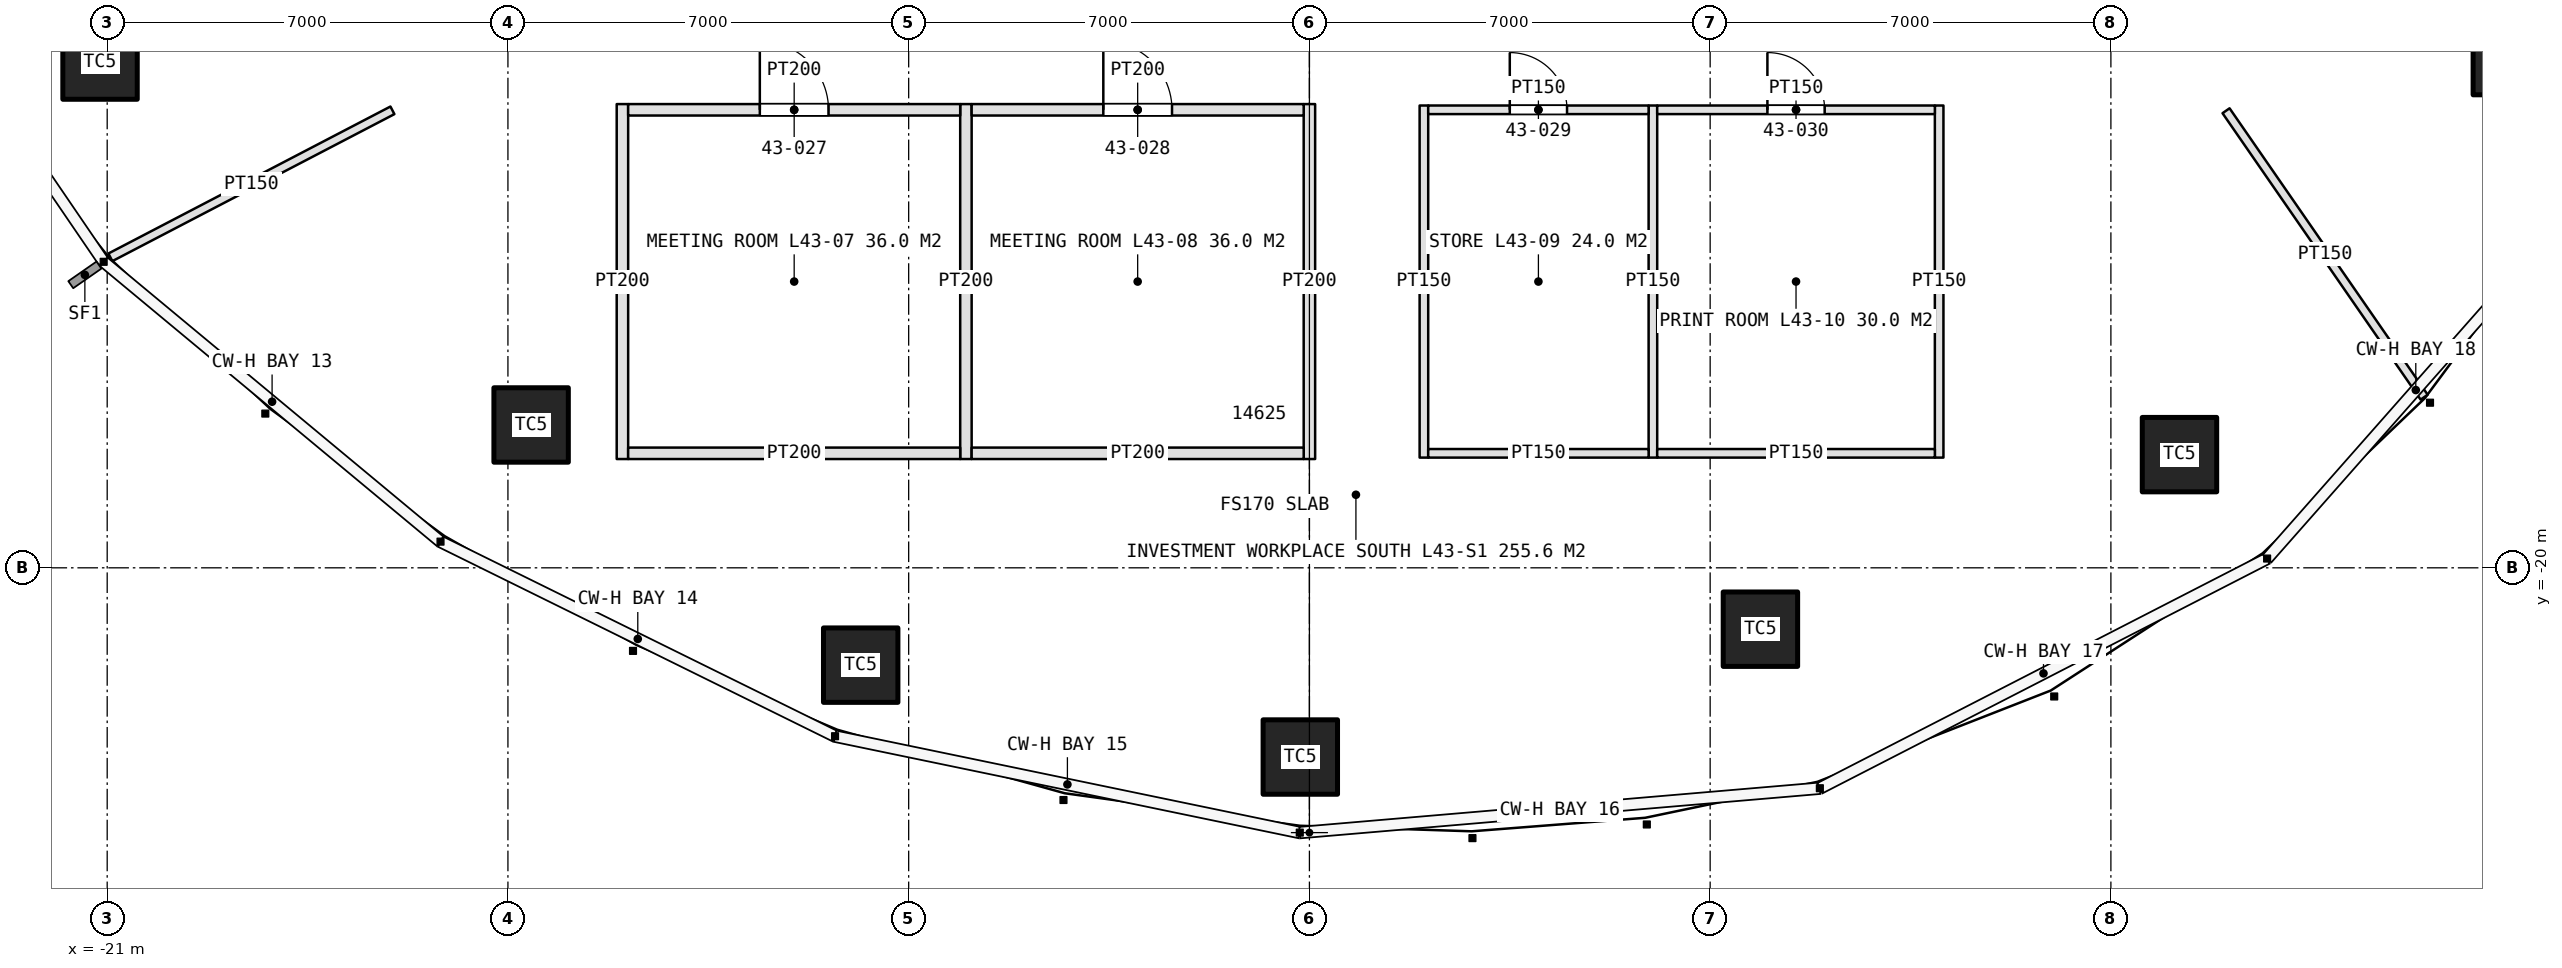
"""IFC4 building model, lengths in metres.
Left out: names, types, materials, properties, quantities, classifications, styles, units other than length and angle.
Written with IfcOpenShell. Run it as: python <this file> out.ifc"""

import sys

from ifc_helpers import new_model, si_unit, direction, frame, frame_2d, origin, origin_2d, place, context, subcontext, project, spatial, rectangle, extrude, element, fill, save


model = new_model("IFC4")
c1 = context("Model", 3, precision=1e-05, world=origin(), true_north=direction((0.0, 1.0)))
c2 = subcontext(c1, "Body", "Model", "MODEL_VIEW")
j1 = project(units=[si_unit("LENGTHUNIT", "METRE"), si_unit("PLANEANGLEUNIT", "RADIAN")], contexts=[c1])
p1 = place(None, origin())
s1 = spatial("IfcSite", under=j1, at=p1, CompositionType="ELEMENT")
p2 = place(p1, origin())
s2 = spatial("IfcBuilding", under=s1, at=p2, CompositionType="ELEMENT")
p3 = place(p2, frame((0.0, 0.0, 199.0)))
s3 = spatial("IfcBuildingStorey", under=s2, at=p3, CompositionType="ELEMENT", Elevation=199.0)
for number, where, z_axis, x_axis in (
    (1, (-21.125, -11.166, 0.0), (0.0, 0.0, 1.0), (1.0, 0.0, 0.0)),
    (2, (-13.595, -17.505, 0.0), (0.0, 0.0, 1.0), (1.0, 0.0, 0.0)),
    (3, (-7.838, -21.7, 0.0), (0.0, 0.0, 1.0), (1.0, 0.0, 0.0)),
    (4, (-0.159, -23.305, 0.0), (0.0, 0.0, 1.0), (1.0, 0.0, 0.0)),
    (5, (7.878, -21.072, 0.0), (0.0, 0.0, 1.0), (1.0, 0.0, 0.0)),
    (6, (15.198, -18.023, 0.0), (0.0, 0.0, 1.0), (1.0, 0.0, 0.0)),
    (7, (20.977, -11.088, 0.0), (0.0, 0.0, 1.0), (1.0, 0.0, 0.0)),
):
    element("IfcColumn", number, at=place(p3, frame(where, z_axis=z_axis, x_axis=x_axis)), inside=s3, PredefinedType="COLUMN", context=c2, shape_type="SweptSolid", body=[
        extrude(rectangle(XDim=1.3, YDim=1.3, at=origin_2d()), origin(), (0.0, 0.0, 1.0), 4.2),
    ])
for number, where, z_axis, x_axis in (
    (8, (-12.0, -11.9, 0.0), (0.0, 0.0, 1.0), (0.0, -1.0, 0.0)),
    (9, (-6.0, -11.9, 0.0), (0.0, 0.0, 1.0), (0.0, -1.0, 0.0)),
    (10, (0.0, -11.9, 0.0), (0.0, 0.0, 1.0), (0.0, -1.0, 0.0)),
):
    element("IfcWall", number, at=place(p3, frame(where, z_axis=z_axis, x_axis=x_axis)), inside=s3, PredefinedType="PARTITIONING", context=c2, shape_type="SweptSolid", body=[
        extrude(rectangle(XDim=6.2, YDim=0.2, at=frame_2d((3.1, 0.0))), origin(), (0.0, 0.0, 1.0), 3.0),
    ])
p4 = place(p3, frame((-11.9, -12.0, 0.0), z_axis=(0.0, 0.0, 1.0), x_axis=(1.0, 0.0, 0.0)))
e11 = element("IfcWall", 11, at=p4, inside=s3, PredefinedType="PARTITIONING", context=c2, shape_type="SweptSolid", body=[
    extrude(rectangle(XDim=5.8, YDim=0.2, at=frame_2d((2.9, 0.0))), origin(), (0.0, 0.0, 1.0), 3.0),
])
p5 = place(p4, frame((2.3, 0.0, 0.0)))
e12 = element("IfcOpeningElement", 12, at=p5, cuts=e11, PredefinedType="OPENING", context=c2, shape_type="SweptSolid", body=[
    extrude(rectangle(XDim=1.2, YDim=2.4, at=frame_2d((0.6, 1.2))), frame((0.0, 0.11, 0.0), z_axis=(0.0, -1.0, 0.0), x_axis=(1.0, 0.0, 0.0)), (0.0, 0.0, 1.0), 0.22),
])
p6 = place(p3, frame((-11.9, -18.0, 0.0), z_axis=(0.0, 0.0, 1.0), x_axis=(1.0, 0.0, 0.0)))
e13 = element("IfcWall", 13, at=p6, inside=s3, PredefinedType="PARTITIONING", context=c2, shape_type="SweptSolid", body=[
    extrude(rectangle(XDim=5.8, YDim=0.2, at=frame_2d((2.9, 0.0))), origin(), (0.0, 0.0, 1.0), 3.0),
])
p7 = place(p3, frame((-5.9, -12.0, 0.0), z_axis=(0.0, 0.0, 1.0), x_axis=(1.0, 0.0, 0.0)))
e14 = element("IfcWall", 14, at=p7, inside=s3, PredefinedType="PARTITIONING", context=c2, shape_type="SweptSolid", body=[
    extrude(rectangle(XDim=5.8, YDim=0.2, at=frame_2d((2.9, 0.0))), origin(), (0.0, 0.0, 1.0), 3.0),
])
p8 = place(p7, frame((2.3, 0.0, 0.0)))
e15 = element("IfcOpeningElement", 15, at=p8, cuts=e14, PredefinedType="OPENING", context=c2, shape_type="SweptSolid", body=[
    extrude(rectangle(XDim=1.2, YDim=2.4, at=frame_2d((0.6, 1.2))), frame((0.0, 0.11, 0.0), z_axis=(0.0, -1.0, 0.0), x_axis=(1.0, 0.0, 0.0)), (0.0, 0.0, 1.0), 0.22),
])
p9 = place(p3, frame((-5.9, -18.0, 0.0), z_axis=(0.0, 0.0, 1.0), x_axis=(1.0, 0.0, 0.0)))
e16 = element("IfcWall", 16, at=p9, inside=s3, PredefinedType="PARTITIONING", context=c2, shape_type="SweptSolid", body=[
    extrude(rectangle(XDim=5.8, YDim=0.2, at=frame_2d((2.9, 0.0))), origin(), (0.0, 0.0, 1.0), 3.0),
])
for number, where, z_axis, x_axis in (
    (17, (2.0, -11.925, 0.0), (0.0, 0.0, 1.0), (0.0, -1.0, 0.0)),
    (18, (6.0, -11.925, 0.0), (0.0, 0.0, 1.0), (0.0, -1.0, 0.0)),
    (19, (11.0, -11.925, 0.0), (0.0, 0.0, 1.0), (0.0, -1.0, 0.0)),
):
    element("IfcWall", number, at=place(p3, frame(where, z_axis=z_axis, x_axis=x_axis)), inside=s3, PredefinedType="PARTITIONING", context=c2, shape_type="SweptSolid", body=[
        extrude(rectangle(XDim=6.15, YDim=0.15, at=frame_2d((3.075, 0.0))), origin(), (0.0, 0.0, 1.0), 3.0),
    ])
p10 = place(p3, frame((2.075, -12.0, 0.0), z_axis=(0.0, 0.0, 1.0), x_axis=(1.0, 0.0, 0.0)))
e20 = element("IfcWall", 20, at=p10, inside=s3, PredefinedType="PARTITIONING", context=c2, shape_type="SweptSolid", body=[
    extrude(rectangle(XDim=3.85, YDim=0.15, at=frame_2d((1.925, 0.0))), origin(), (0.0, 0.0, 1.0), 3.0),
])
p11 = place(p10, frame((1.425, 0.0, 0.0)))
e21 = element("IfcOpeningElement", 21, at=p11, cuts=e20, PredefinedType="OPENING", context=c2, shape_type="SweptSolid", body=[
    extrude(rectangle(XDim=1.0, YDim=2.2, at=frame_2d((0.5, 1.1))), frame((0.0, 0.085, 0.0), z_axis=(0.0, -1.0, 0.0), x_axis=(1.0, 0.0, 0.0)), (0.0, 0.0, 1.0), 0.17),
])
p12 = place(p3, frame((2.075, -18.0, 0.0), z_axis=(0.0, 0.0, 1.0), x_axis=(1.0, 0.0, 0.0)))
e22 = element("IfcWall", 22, at=p12, inside=s3, PredefinedType="PARTITIONING", context=c2, shape_type="SweptSolid", body=[
    extrude(rectangle(XDim=3.85, YDim=0.15, at=frame_2d((1.925, 0.0))), origin(), (0.0, 0.0, 1.0), 3.0),
])
p13 = place(p3, frame((6.075, -12.0, 0.0), z_axis=(0.0, 0.0, 1.0), x_axis=(1.0, 0.0, 0.0)))
e23 = element("IfcWall", 23, at=p13, inside=s3, PredefinedType="PARTITIONING", context=c2, shape_type="SweptSolid", body=[
    extrude(rectangle(XDim=4.85, YDim=0.15, at=frame_2d((2.425, 0.0))), origin(), (0.0, 0.0, 1.0), 3.0),
])
p14 = place(p13, frame((1.925, 0.0, 0.0)))
e24 = element("IfcOpeningElement", 24, at=p14, cuts=e23, PredefinedType="OPENING", context=c2, shape_type="SweptSolid", body=[
    extrude(rectangle(XDim=1.0, YDim=2.2, at=frame_2d((0.5, 1.1))), frame((0.0, 0.085, 0.0), z_axis=(0.0, -1.0, 0.0), x_axis=(1.0, 0.0, 0.0)), (0.0, 0.0, 1.0), 0.17),
])
p15 = place(p3, frame((6.075, -18.0, 0.0), z_axis=(0.0, 0.0, 1.0), x_axis=(1.0, 0.0, 0.0)))
e25 = element("IfcWall", 25, at=p15, inside=s3, PredefinedType="PARTITIONING", context=c2, shape_type="SweptSolid", body=[
    extrude(rectangle(XDim=4.85, YDim=0.15, at=frame_2d((2.425, 0.0))), origin(), (0.0, 0.0, 1.0), 3.0),
])
p16 = place(p3, frame((-16.018, -12.009, 0.0), z_axis=(0.0, 0.0, 1.0), x_axis=(-0.886831549241, -0.462092851351, 0.0)))
e26 = element("IfcWall", 26, at=p16, inside=s3, PredefinedType="PARTITIONING", context=c2, shape_type="SweptSolid", body=[
    extrude(rectangle(XDim=5.555, YDim=0.15, at=frame_2d((2.778, 0.0))), origin(), (0.0, 0.0, 1.0), 3.0),
])
p17 = place(p3, frame((16.011, -12.016, 0.0), z_axis=(0.0, 0.0, 1.0), x_axis=(0.568863489071, -0.822431961199, 0.0)))
e27 = element("IfcWall", 27, at=p17, inside=s3, PredefinedType="PARTITIONING", context=c2, shape_type="SweptSolid", body=[
    extrude(rectangle(XDim=6.083, YDim=0.15, at=frame_2d((3.042, 0.0))), origin(), (0.0, 0.0, 1.0), 3.0),
])
p18 = place(p5, origin())
e28 = element("IfcDoor", 28, at=p18, inside=s3, OperationType="SINGLE_SWING_LEFT", PredefinedType="DOOR", context=c2, shape_type="SweptSolid", body=[
    extrude(rectangle(XDim=1.2, YDim=2.4, at=frame_2d((0.6, 1.2))), frame((0.0, 0.025, 0.0), z_axis=(0.0, -1.0, 0.0), x_axis=(1.0, 0.0, 0.0)), (0.0, 0.0, 1.0), 0.05),
])
fill(e12, e28)
p19 = place(p8, origin())
e29 = element("IfcDoor", 29, at=p19, inside=s3, OperationType="SINGLE_SWING_LEFT", PredefinedType="DOOR", context=c2, shape_type="SweptSolid", body=[
    extrude(rectangle(XDim=1.2, YDim=2.4, at=frame_2d((0.6, 1.2))), frame((0.0, 0.025, 0.0), z_axis=(0.0, -1.0, 0.0), x_axis=(1.0, 0.0, 0.0)), (0.0, 0.0, 1.0), 0.05),
])
fill(e15, e29)
p20 = place(p11, origin())
e30 = element("IfcDoor", 30, at=p20, inside=s3, OperationType="SINGLE_SWING_LEFT", PredefinedType="DOOR", context=c2, shape_type="SweptSolid", body=[
    extrude(rectangle(XDim=1.0, YDim=2.2, at=frame_2d((0.5, 1.1))), frame((0.0, 0.025, 0.0), z_axis=(0.0, -1.0, 0.0), x_axis=(1.0, 0.0, 0.0)), (0.0, 0.0, 1.0), 0.05),
])
fill(e21, e30)
p21 = place(p14, origin())
e31 = element("IfcDoor", 31, at=p21, inside=s3, OperationType="SINGLE_SWING_LEFT", PredefinedType="DOOR", context=c2, shape_type="SweptSolid", body=[
    extrude(rectangle(XDim=1.0, YDim=2.2, at=frame_2d((0.5, 1.1))), frame((0.0, 0.025, 0.0), z_axis=(0.0, -1.0, 0.0), x_axis=(1.0, 0.0, 0.0)), (0.0, 0.0, 1.0), 0.05),
])
fill(e24, e31)
save(model, sys.argv[1])
